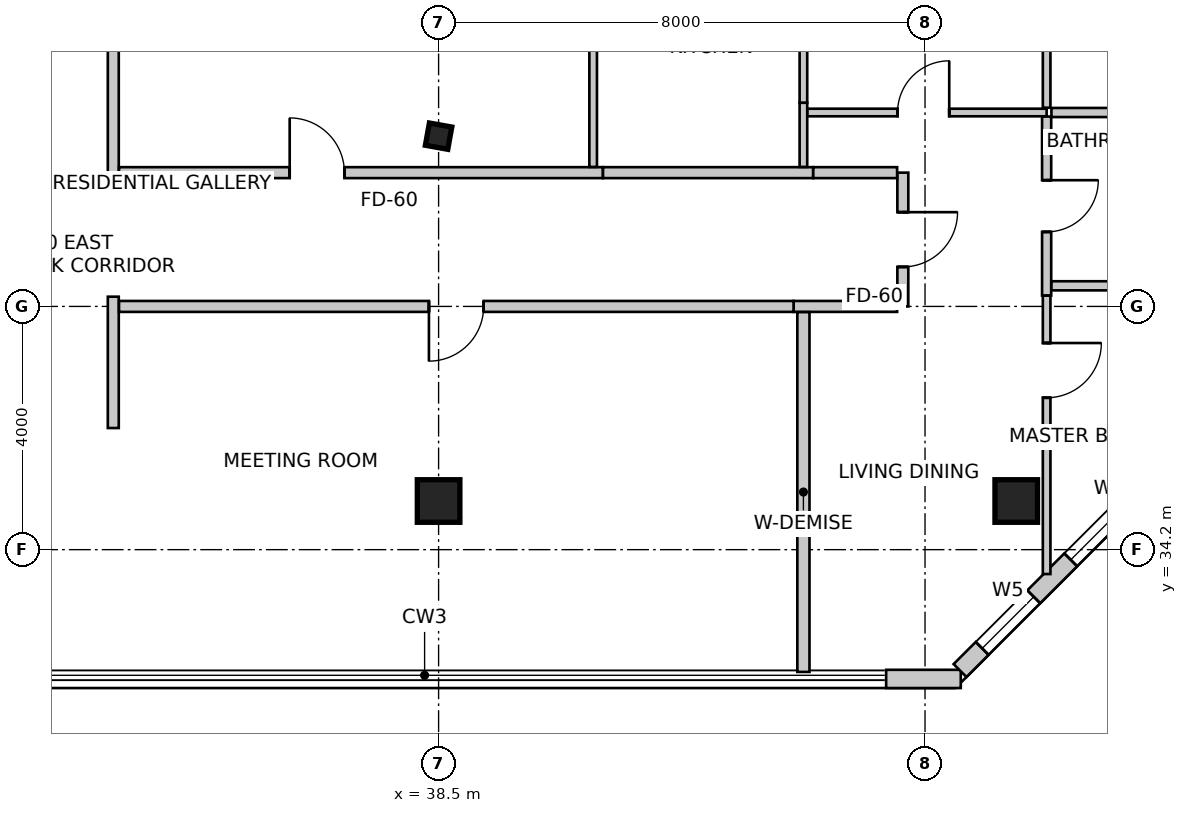
"""IFC4 building model, lengths in metres.
Left out: names, types, materials, properties, quantities, classifications, styles, units other than length and angle.
Written with IfcOpenShell. Run it as: python <this file> out.ifc"""

import sys

from ifc_helpers import new_model, si_unit, direction, frame, frame_2d, origin, origin_2d, place, context, subcontext, project, spatial, rectangle, i_section, extrude, source, transform, mapped, element, fill, save


model = new_model("IFC4")
c1 = context("Model", 3, precision=1e-05, world=origin(), true_north=direction((0.0, 1.0)))
c2 = subcontext(c1, "Body", "Model", "MODEL_VIEW")
j1 = project(units=[si_unit("LENGTHUNIT", "METRE"), si_unit("PLANEANGLEUNIT", "RADIAN")], contexts=[c1])
p1 = place(None, origin())
s1 = spatial("IfcSite", under=j1, at=p1, CompositionType="ELEMENT")
p2 = place(p1, origin())
s2 = spatial("IfcBuilding", under=s1, at=p2, CompositionType="ELEMENT")
p3 = place(p2, frame((0.0, 0.0, 200.9)))
s3 = spatial("IfcBuildingStorey", under=s2, at=p3, CompositionType="ELEMENT", Elevation=200.9)
m1 = source(origin(), c2, "Body", "SweptSolid", [
    extrude(rectangle(XDim=0.7, YDim=0.7, at=origin_2d()), origin(), (0.0, 0.0, 1.0), 3.5),
])
for number, where, z_axis, x_axis in (
    (1, (38.5, 35.0, 0.0), (0.0, 0.0, 1.0), (1.0, 0.0, 0.0)),
    (2, (48.0, 35.0, 0.0), (0.0, 0.0, 1.0), (1.0, 0.0, 0.0)),
):
    element("IfcColumn", number, at=place(p3, frame(where, z_axis=z_axis, x_axis=x_axis)), inside=s3, PredefinedType="COLUMN", context=c2, shape_type="MappedRepresentation", body=[
        mapped(m1, transform((0.0, 0.0, 0.0), scale=1.0)),
    ])
m2 = source(origin(), c2, "Body", "SweptSolid", [
    extrude(i_section(OverallWidth=0.374, OverallDepth=0.372, WebThickness=0.016, FlangeThickness=0.026, FilletRadius=0.015, at=origin_2d()), origin(), (0.0, 0.0, 1.0), 3.5),
])
p4 = place(p3, frame((38.5, 41.0, 0.0), z_axis=(0.0, 0.0, 1.0), x_axis=(0.984195607969, -0.17708474032, 0.0)))
e3 = element("IfcColumn", 3, at=p4, inside=s3, PredefinedType="COLUMN", context=c2, shape_type="MappedRepresentation", body=[
    mapped(m2, transform((0.0, 0.0, 0.0), scale=1.0)),
])
p5 = place(p3, frame((45.86, 32.074, 0.0), z_axis=(0.0, 0.0, 1.0), x_axis=(1.0, 0.0, 0.0)))
e4 = element("IfcWall", 4, at=p5, inside=s3, PredefinedType="SOLIDWALL", context=c2, shape_type="SweptSolid", body=[
    extrude(rectangle(XDim=1.228, YDim=0.3, at=frame_2d((0.614, 0.0))), origin(), (0.0, 0.0, 1.0), 3.25),
])
p6 = place(p3, frame((47.076, 32.212, 0.0), z_axis=(0.0, 0.0, 1.0), x_axis=(0.707106781187, 0.707106781187, 0.0)))
e5 = element("IfcWall", 5, at=p6, inside=s3, PredefinedType="SOLIDWALL", context=c2, shape_type="SweptSolid", body=[
    extrude(rectangle(XDim=4.922, YDim=0.3, at=frame_2d((2.461, 0.0))), origin(), (0.0, 0.0, 1.0), 3.25),
])
m3 = source(origin(), c2, "Body", "SweptSolid", [
    extrude(rectangle(XDim=1.2, YDim=1.6, at=frame_2d((0.6, 0.8))), frame((0.0, 0.16, 0.0), z_axis=(0.0, -1.0, 0.0), x_axis=(1.0, 0.0, 0.0)), (0.0, 0.0, 1.0), 0.32),
])
p7 = place(p6, frame((0.515, 0.0, 0.85)))
e6 = element("IfcOpeningElement", 6, at=p7, cuts=e5, PredefinedType="OPENING", context=c2, shape_type="MappedRepresentation", body=[
    mapped(m3, transform((0.0, 0.0, 0.0), scale=1.0)),
])
m4 = source(origin(), c2, "Body", "SweptSolid", [
    extrude(rectangle(XDim=1.8, YDim=2.1, at=frame_2d((0.9, 1.05))), frame((0.0, 0.16, 0.0), z_axis=(0.0, -1.0, 0.0), x_axis=(1.0, 0.0, 0.0)), (0.0, 0.0, 1.0), 0.32),
])
p8 = place(p6, frame((2.575, 0.0, 0.85)))
e7 = element("IfcOpeningElement", 7, at=p8, cuts=e5, PredefinedType="OPENING", context=c2, shape_type="MappedRepresentation", body=[
    mapped(m4, transform((0.0, 0.0, 0.0), scale=1.0)),
])
p9 = place(p3, frame((33.15, 45.766, 0.0), z_axis=(0.0, 0.0, 1.0), x_axis=(0.0, -1.0, 0.0)))
e8 = element("IfcWall", 8, at=p9, inside=s3, PredefinedType="PARTITIONING", context=c2, shape_type="SweptSolid", body=[
    extrude(rectangle(XDim=5.526, YDim=0.18, at=frame_2d((2.763, 0.0))), origin(), (0.0, 0.0, 1.0), 2.822),
])
p10 = place(p3, frame((33.15, 38.36, 0.0), z_axis=(0.0, 0.0, 1.0), x_axis=(0.0, -1.0, 0.0)))
e9 = element("IfcWall", 9, at=p10, inside=s3, PredefinedType="PARTITIONING", context=c2, shape_type="SweptSolid", body=[
    extrude(rectangle(XDim=2.16, YDim=0.18, at=frame_2d((1.08, 0.0))), origin(), (0.0, 0.0, 1.0), 3.25),
])
p11 = place(p3, frame((33.244, 40.4, 0.0), z_axis=(0.0, 0.0, 1.0), x_axis=(1.0, 0.0, 0.0)))
e10 = element("IfcWall", 10, at=p11, inside=s3, PredefinedType="PARTITIONING", context=c2, shape_type="SweptSolid", body=[
    extrude(rectangle(XDim=7.958, YDim=0.18, at=frame_2d((3.979, 0.0))), origin(), (0.0, 0.0, 1.0), 2.766),
])
m5 = source(origin(), c2, "Body", "SweptSolid", [
    extrude(rectangle(XDim=0.9, YDim=2.15, at=frame_2d((0.45, 1.075))), frame((0.0, 0.1, 0.0), z_axis=(0.0, -1.0, 0.0), x_axis=(1.0, 0.0, 0.0)), (0.0, 0.0, 1.0), 0.2),
])
p12 = place(p11, frame((2.807, 0.0, 0.0)))
e11 = element("IfcOpeningElement", 11, at=p12, cuts=e10, PredefinedType="OPENING", context=c2, shape_type="MappedRepresentation", body=[
    mapped(m5, transform((0.0, 0.0, 0.0), scale=1.0)),
])
p13 = place(p3, frame((41.204, 40.4, 0.0), z_axis=(0.0, 0.0, 1.0), x_axis=(1.0, 0.0, 0.0)))
e12 = element("IfcWall", 12, at=p13, inside=s3, PredefinedType="PARTITIONING", context=c2, shape_type="SweptSolid", body=[
    extrude(rectangle(XDim=3.456, YDim=0.18, at=frame_2d((1.728, 0.0))), origin(), (0.0, 0.0, 1.0), 2.822),
])
p14 = place(p3, frame((46.135, 40.4, 0.0), z_axis=(0.0, 0.0, 1.0), x_axis=(0.0, -1.0, 0.0)))
e13 = element("IfcWall", 13, at=p14, inside=s3, PredefinedType="PARTITIONING", context=c2, shape_type="SweptSolid", body=[
    extrude(rectangle(XDim=2.2, YDim=0.18, at=frame_2d((1.1, 0.0))), origin(), (0.0, 0.0, 1.0), 3.25),
])
p15 = place(p14, frame((0.65, 0.0, 0.0)))
e14 = element("IfcOpeningElement", 14, at=p15, cuts=e13, PredefinedType="OPENING", context=c2, shape_type="MappedRepresentation", body=[
    mapped(m5, transform((0.0, 0.0, 0.0), scale=1.0)),
])
p16 = place(p3, frame((44.662, 40.4, 0.0), z_axis=(0.0, 0.0, 1.0), x_axis=(1.0, 0.0, 0.0)))
e15 = element("IfcWall", 15, at=p16, inside=s3, PredefinedType="PARTITIONING", context=c2, shape_type="SweptSolid", body=[
    extrude(rectangle(XDim=1.379, YDim=0.18, at=frame_2d((0.689, 0.0))), origin(), (0.0, 0.0, 1.0), 3.25),
])
p17 = place(p3, frame((46.041, 38.2, 0.0), z_axis=(0.0, 0.0, 1.0), x_axis=(-1.0, 0.0, 0.0)))
e16 = element("IfcWall", 16, at=p17, inside=s3, PredefinedType="PARTITIONING", context=c2, shape_type="SweptSolid", body=[
    extrude(rectangle(XDim=1.701, YDim=0.18, at=frame_2d((0.851, 0.0))), origin(), (0.0, 0.0, 1.0), 2.934),
])
p18 = place(p3, frame((44.338, 38.2, 0.0), z_axis=(0.0, 0.0, 1.0), x_axis=(-1.0, 0.0, 0.0)))
e17 = element("IfcWall", 17, at=p18, inside=s3, PredefinedType="PARTITIONING", context=c2, shape_type="SweptSolid", body=[
    extrude(rectangle(XDim=11.094, YDim=0.18, at=frame_2d((5.547, 0.0))), origin(), (0.0, 0.0, 1.0), 2.766),
])
p19 = place(p18, frame((5.097, 0.0, 0.0)))
e18 = element("IfcOpeningElement", 18, at=p19, cuts=e17, PredefinedType="OPENING", context=c2, shape_type="MappedRepresentation", body=[
    mapped(m5, transform((0.0, 0.0, 0.0), scale=1.0)),
])
p20 = place(p3, frame((41.042, 45.606, 0.0), z_axis=(0.0, 0.0, 1.0), x_axis=(0.0, -1.0, 0.0)))
e19 = element("IfcWall", 19, at=p20, inside=s3, PredefinedType="PARTITIONING", context=c2, shape_type="SweptSolid", body=[
    extrude(rectangle(XDim=5.112, YDim=0.125, at=frame_2d((2.556, 0.0))), origin(), (0.0, 0.0, 1.0), 2.822),
])
m6 = source(origin(), c2, "Body", "SweptSolid", [
    extrude(rectangle(XDim=0.85, YDim=2.15, at=frame_2d((0.425, 1.075))), frame((0.0, 0.073, 0.0), z_axis=(0.0, -1.0, 0.0), x_axis=(1.0, 0.0, 0.0)), (0.0, 0.0, 1.0), 0.145),
])
p21 = place(p20, frame((2.131, 0.0, 0.0)))
e20 = element("IfcOpeningElement", 20, at=p21, cuts=e19, PredefinedType="OPENING", context=c2, shape_type="MappedRepresentation", body=[
    mapped(m6, transform((0.0, 0.0, 0.0), scale=1.0)),
])
p22 = place(p3, frame((44.5, 41.549, 0.0), z_axis=(0.0, 0.0, 1.0), x_axis=(0.0, -1.0, 0.0)))
e21 = element("IfcWall", 21, at=p22, inside=s3, PredefinedType="PARTITIONING", context=c2, shape_type="SweptSolid", body=[
    extrude(rectangle(XDim=1.055, YDim=0.125, at=frame_2d((0.528, 0.0))), origin(), (0.0, 0.0, 1.0), 2.822),
])
p23 = place(p3, frame((44.5, 44.827, 0.0), z_axis=(0.0, 0.0, 1.0), x_axis=(0.0, -1.0, 0.0)))
e22 = element("IfcWall", 22, at=p23, inside=s3, PredefinedType="PARTITIONING", context=c2, shape_type="SweptSolid", body=[
    extrude(rectangle(XDim=3.276, YDim=0.125, at=frame_2d((1.638, 0.0))), origin(), (0.0, 0.0, 1.0), 2.822),
])
p24 = place(p3, frame((44.566, 41.389, 0.0), z_axis=(0.0, 0.0, 1.0), x_axis=(1.0, 0.0, 0.0)))
e23 = element("IfcWall", 23, at=p24, inside=s3, PredefinedType="PARTITIONING", context=c2, shape_type="SweptSolid", body=[
    extrude(rectangle(XDim=3.934, YDim=0.125, at=frame_2d((1.967, 0.0))), origin(), (0.0, 0.0, 1.0), 2.766),
])
p25 = place(p24, frame((1.482, 0.0, 0.0)))
e24 = element("IfcOpeningElement", 24, at=p25, cuts=e23, PredefinedType="OPENING", context=c2, shape_type="MappedRepresentation", body=[
    mapped(m6, transform((0.0, 0.0, 0.0), scale=1.0)),
])
p26 = place(p3, frame((48.5, 41.323, 0.0), z_axis=(0.0, 0.0, 1.0), x_axis=(0.0, -1.0, 0.0)))
e25 = element("IfcWall", 25, at=p26, inside=s3, PredefinedType="PARTITIONING", context=c2, shape_type="SweptSolid", body=[
    extrude(rectangle(XDim=2.944, YDim=0.15, at=frame_2d((1.472, 0.0))), origin(), (0.0, 0.0, 1.0), 3.25),
])
m7 = source(origin(), c2, "Body", "SweptSolid", [
    extrude(rectangle(XDim=0.85, YDim=2.15, at=frame_2d((0.425, 1.075))), frame((0.0, 0.085, 0.0), z_axis=(0.0, -1.0, 0.0), x_axis=(1.0, 0.0, 0.0)), (0.0, 0.0, 1.0), 0.17),
])
p27 = place(p26, frame((1.047, 0.0, 0.0)))
e26 = element("IfcOpeningElement", 26, at=p27, cuts=e25, PredefinedType="OPENING", context=c2, shape_type="MappedRepresentation", body=[
    mapped(m7, transform((0.0, 0.0, 0.0), scale=1.0)),
])
p28 = place(p3, frame((48.5, 38.377, 0.0), z_axis=(0.0, 0.0, 1.0), x_axis=(0.0, -1.0, 0.0)))
e27 = element("IfcWall", 27, at=p28, inside=s3, PredefinedType="PARTITIONING", context=c2, shape_type="SweptSolid", body=[
    extrude(rectangle(XDim=4.578, YDim=0.125, at=frame_2d((2.289, 0.0))), origin(), (0.0, 0.0, 1.0), 3.25),
])
m8 = source(origin(), c2, "Body", "SweptSolid", [
    extrude(rectangle(XDim=0.9, YDim=2.15, at=frame_2d((0.45, 1.075))), frame((0.0, 0.073, 0.0), z_axis=(0.0, -1.0, 0.0), x_axis=(1.0, 0.0, 0.0)), (0.0, 0.0, 1.0), 0.145),
])
p29 = place(p28, frame((0.779, 0.0, 0.0)))
e28 = element("IfcOpeningElement", 28, at=p29, cuts=e27, PredefinedType="OPENING", context=c2, shape_type="MappedRepresentation", body=[
    mapped(m8, transform((0.0, 0.0, 0.0), scale=1.0)),
])
p30 = place(p3, frame((44.5, 32.189, 0.0), z_axis=(0.0, 0.0, 1.0), x_axis=(0.0, 1.0, 0.0)))
e29 = element("IfcWall", 29, at=p30, inside=s3, PredefinedType="PARTITIONING", context=c2, shape_type="SweptSolid", body=[
    extrude(rectangle(XDim=5.917, YDim=0.2, at=frame_2d((2.958, 0.0))), origin(), (0.0, 0.0, 1.0), 2.542),
])
p31 = place(p3, frame((48.5, 44.923, 0.0), z_axis=(0.0, 0.0, 1.0), x_axis=(0.0, -1.0, 0.0)))
e30 = element("IfcWall", 30, at=p31, inside=s3, PredefinedType="PARTITIONING", context=c2, shape_type="SweptSolid", body=[
    extrude(rectangle(XDim=3.455, YDim=0.125, at=frame_2d((1.727, 0.0))), origin(), (0.0, 0.0, 1.0), 3.25),
])
p32 = place(p31, frame((1.277, 0.0, 0.0)))
e31 = element("IfcOpeningElement", 31, at=p32, cuts=e30, PredefinedType="OPENING", context=c2, shape_type="MappedRepresentation", body=[
    mapped(m8, transform((0.0, 0.0, 0.0), scale=1.0)),
])
for number, where, z_axis, x_axis in (
    (32, (48.579, 41.389, 0.0), (0.0, 0.0, 1.0), (1.0, 0.0, 0.0)),
    (33, (50.335, 38.539, 0.0), (0.0, 0.0, 1.0), (-1.0, 0.0, 0.0)),
):
    element("IfcWall", number, at=place(p3, frame(where, z_axis=z_axis, x_axis=x_axis)), inside=s3, PredefinedType="PARTITIONING", context=c2, shape_type="SweptSolid", body=[
        extrude(rectangle(XDim=1.756, YDim=0.15, at=frame_2d((0.878, 0.0))), origin(), (0.0, 0.0, 1.0), 3.25),
    ])
m9 = source(origin(), c2, "Body", "SweptSolid", [
    extrude(rectangle(XDim=1.2, YDim=1.6, at=frame_2d((0.6, 0.8))), frame((0.0, -0.015, 0.0), z_axis=(0.0, -1.0, 0.0), x_axis=(1.0, 0.0, 0.0)), (0.0, 0.0, 1.0), 0.06),
])
p33 = place(p7, origin())
e34 = element("IfcWindow", 34, at=p33, inside=s3, PartitioningType="SINGLE_PANEL", PredefinedType="WINDOW", context=c2, shape_type="MappedRepresentation", body=[
    mapped(m9, transform((0.0, 0.0, 0.0), scale=1.0)),
])
fill(e6, e34)
m10 = source(origin(), c2, "Body", "SweptSolid", [
    extrude(rectangle(XDim=1.8, YDim=2.1, at=frame_2d((0.9, 1.05))), frame((0.0, -0.015, 0.0), z_axis=(0.0, -1.0, 0.0), x_axis=(1.0, 0.0, 0.0)), (0.0, 0.0, 1.0), 0.06),
])
p34 = place(p8, origin())
e35 = element("IfcWindow", 35, at=p34, inside=s3, PartitioningType="SINGLE_PANEL", PredefinedType="WINDOW", context=c2, shape_type="MappedRepresentation", body=[
    mapped(m10, transform((0.0, 0.0, 0.0), scale=1.0)),
])
fill(e7, e35)
m11 = source(origin(), c2, "Body", "SweptSolid", [
    extrude(rectangle(XDim=0.9, YDim=2.15, at=frame_2d((0.45, 1.075))), frame((0.0, 0.025, 0.0), z_axis=(0.0, -1.0, 0.0), x_axis=(1.0, 0.0, 0.0)), (0.0, 0.0, 1.0), 0.05),
])
p35 = place(p12, origin())
e36 = element("IfcDoor", 36, at=p35, inside=s3, OperationType="SINGLE_SWING_LEFT", PredefinedType="DOOR", context=c2, shape_type="MappedRepresentation", body=[
    mapped(m11, transform((0.0, 0.0, 0.0), scale=1.0)),
])
fill(e11, e36)
p36 = place(p15, origin())
e37 = element("IfcDoor", 37, at=p36, inside=s3, OperationType="SINGLE_SWING_LEFT", PredefinedType="DOOR", context=c2, shape_type="MappedRepresentation", body=[
    mapped(m11, transform((0.0, 0.0, 0.0), scale=1.0)),
])
fill(e14, e37)
m12 = source(origin(), c2, "Body", "SweptSolid", [
    extrude(rectangle(XDim=0.85, YDim=2.15, at=frame_2d((0.425, 1.075))), frame((0.0, 0.025, 0.0), z_axis=(0.0, -1.0, 0.0), x_axis=(1.0, 0.0, 0.0)), (0.0, 0.0, 1.0), 0.05),
])
p37 = place(p25, origin())
e38 = element("IfcDoor", 38, at=p37, inside=s3, OperationType="SINGLE_SWING_RIGHT", PredefinedType="DOOR", context=c2, shape_type="MappedRepresentation", body=[
    mapped(m12, transform((0.0, 0.0, 0.0), scale=1.0)),
])
fill(e24, e38)
p38 = place(p27, origin())
e39 = element("IfcDoor", 39, at=p38, inside=s3, OperationType="SINGLE_SWING_LEFT", PredefinedType="DOOR", context=c2, shape_type="MappedRepresentation", body=[
    mapped(m12, transform((0.0, 0.0, 0.0), scale=1.0)),
])
fill(e26, e39)
m13 = source(origin(), c2, "Body", "SweptSolid", [
    extrude(rectangle(XDim=0.9, YDim=2.15, at=frame_2d((0.45, 1.075))), frame((0.0, 0.025, 0.0), z_axis=(0.0, -1.0, 0.0), x_axis=(1.0, 0.0, 0.0)), (0.0, 0.0, 1.0), 0.05),
])
p39 = place(p29, origin())
e40 = element("IfcDoor", 40, at=p39, inside=s3, OperationType="SINGLE_SWING_LEFT", PredefinedType="DOOR", context=c2, shape_type="MappedRepresentation", body=[
    mapped(m13, transform((0.0, 0.0, 0.0), scale=1.0)),
])
fill(e28, e40)
p40 = place(p19, origin())
e41 = element("IfcDoor", 41, at=p40, inside=s3, OperationType="SINGLE_SWING_RIGHT", PredefinedType="DOOR", context=c2, shape_type="MappedRepresentation", body=[
    mapped(m13, transform((0.0, 0.0, 0.0), scale=1.0)),
])
fill(e18, e41)
save(model, sys.argv[1])
